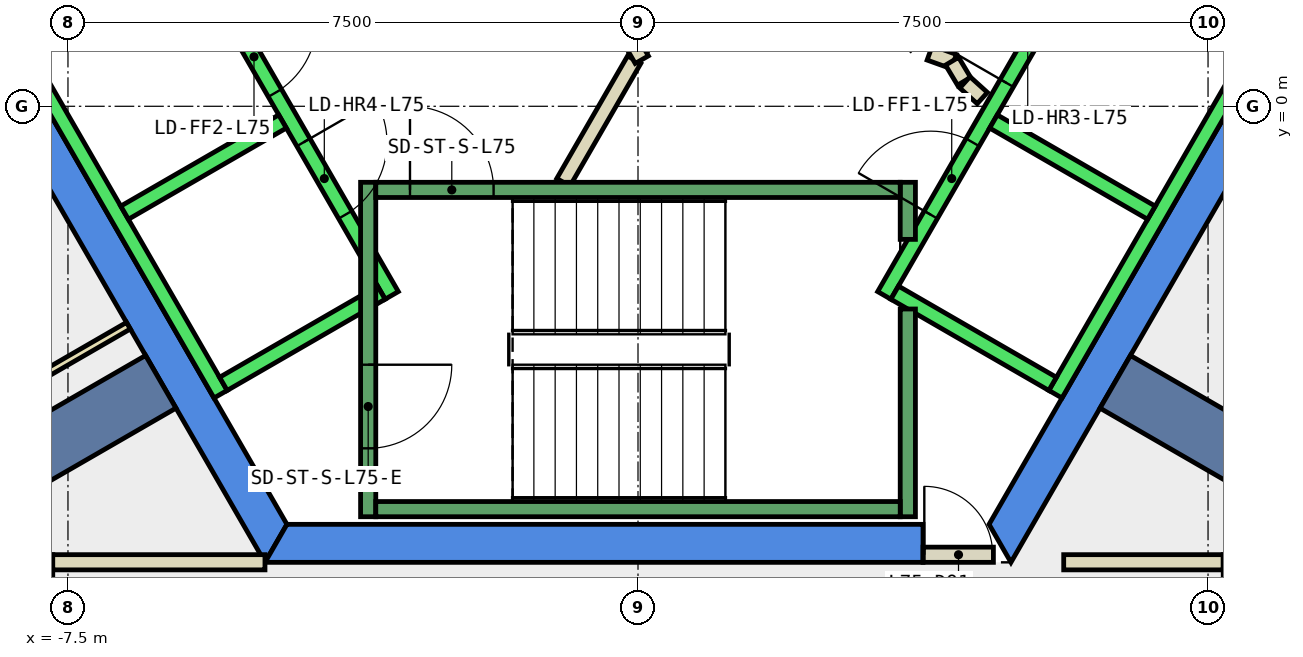
"""IFC4 building model, lengths in metres.
Left out: names, types, materials, properties, quantities, classifications, styles, units other than length and angle.
Written with IfcOpenShell. Run it as: python <this file> out.ifc"""

import sys

from ifc_helpers import new_model, si_unit, direction, frame, frame_2d, origin, place, context, subcontext, project, spatial, polyline, rectangle, outline, extrude, element, fill, save


model = new_model("IFC4")
c1 = context("Model", 3, precision=1e-05, world=origin(), true_north=direction((0.0, 1.0)))
c2 = subcontext(c1, "Body", "Model", "MODEL_VIEW")
j1 = project(units=[si_unit("LENGTHUNIT", "METRE"), si_unit("PLANEANGLEUNIT", "RADIAN")], contexts=[c1])
p1 = place(None, origin())
s1 = spatial("IfcSite", under=j1, at=p1, CompositionType="ELEMENT")
p2 = place(p1, origin())
s2 = spatial("IfcBuilding", under=s1, at=p2, CompositionType="ELEMENT")
p3 = place(p2, frame((0.0, 0.0, 318.8)))
s3 = spatial("IfcBuildingStorey", under=s2, at=p3, CompositionType="ELEMENT", Elevation=318.8)
p4 = place(p3, frame((0.0, 0.0, -0.34)))
e1 = element("IfcWall", 1, at=p4, inside=s3, PredefinedType="SHEAR", context=c2, shape_type="SweptSolid", body=[
    extrude(outline(polyline([(-9.815, 2.5), (-4.907, -6.0), (-4.619, -5.5), (-9.238, 2.5), (-9.815, 2.5)])), origin(), (0.0, 0.0, 1.0), 3.6),
])
p5 = place(p3, frame((0.0, 0.0, -0.34)))
e2 = element("IfcWall", 2, at=p5, inside=s3, PredefinedType="SHEAR", context=c2, shape_type="SweptSolid", body=[
    extrude(outline(polyline([(3.75, -6.0), (3.75, -5.5), (-4.619, -5.5), (-4.907, -6.0), (3.75, -6.0)])), origin(), (0.0, 0.0, 1.0), 3.6),
])
p6 = place(p3, frame((0.0, 0.0, -0.34)))
e3 = element("IfcWall", 3, at=p6, inside=s3, PredefinedType="SHEAR", context=c2, shape_type="SweptSolid", body=[
    extrude(outline(polyline([(4.907, -6.0), (9.815, 2.5), (9.238, 2.5), (4.619, -5.5), (4.907, -6.0)])), origin(), (0.0, 0.0, 1.0), 3.6),
])
for number, where, z_axis, x_axis in (
    (4, (6.279, -3.625, -0.34), (0.0, 0.0, 1.0), (0.866, -0.5, 0.0)),
    (5, (-6.279, -3.625, -0.34), (0.0, 0.0, 1.0), (-0.866, -0.5, 0.0)),
):
    element("IfcWall", number, at=place(p3, frame(where, z_axis=z_axis, x_axis=x_axis)), inside=s3, PredefinedType="SHEAR", context=c2, shape_type="SweptSolid", body=[
        extrude(rectangle(XDim=9.0, YDim=0.8, at=frame_2d((4.5, 0.0))), origin(), (0.0, 0.0, 1.0), 3.6),
    ])
p7 = place(p3, frame((-0.982, -1.0, 0.0), z_axis=(0.0, 0.0, 1.0), x_axis=(0.50024047865, 0.865886518847, 0.0)))
e6 = element("IfcWall", 6, at=p7, inside=s3, PredefinedType="PARTITIONING", context=c2, shape_type="SweptSolid", body=[
    extrude(rectangle(XDim=1.863, YDim=0.2, at=frame_2d((0.931, 0.0))), origin(), (0.0, 0.0, 1.0), 3.26),
])
p8 = place(p3, frame((3.838, 0.702, 0.0), z_axis=(0.0, 0.0, 1.0), x_axis=(0.941035081519, -0.338308993895, 0.0)))
e7 = element("IfcWall", 7, at=p8, inside=s3, PredefinedType="PARTITIONING", context=c2, shape_type="SweptSolid", body=[
    extrude(rectangle(XDim=0.337, YDim=0.2, at=frame_2d((0.168, 0.0))), origin(), (0.0, 0.0, 1.0), 3.26),
])
p9 = place(p3, frame((4.132, 0.593, 0.0), z_axis=(0.0, 0.0, 1.0), x_axis=(0.513561617048, -0.858052717201, 0.0)))
e8 = element("IfcWall", 8, at=p9, inside=s3, PredefinedType="PARTITIONING", context=c2, shape_type="SweptSolid", body=[
    extrude(rectangle(XDim=0.308, YDim=0.2, at=frame_2d((0.154, 0.0))), origin(), (0.0, 0.0, 1.0), 3.26),
])
p10 = place(p3, frame((4.301, 0.315, 0.0), z_axis=(0.0, 0.0, 1.0), x_axis=(0.741798017506, -0.670623367639, 0.0)))
e9 = element("IfcWall", 9, at=p10, inside=s3, PredefinedType="PARTITIONING", context=c2, shape_type="SweptSolid", body=[
    extrude(rectangle(XDim=0.309, YDim=0.2, at=frame_2d((0.154, 0.0))), origin(), (0.0, 0.0, 1.0), 3.26),
])
p11 = place(p3, frame((-2.54, 5.1, 0.0), z_axis=(0.0, 0.0, 1.0), x_axis=(0.499925051871, -0.866068670783, 0.0)))
e10 = element("IfcWall", 10, at=p11, inside=s3, PredefinedType="PARTITIONING", context=c2, shape_type="SweptSolid", body=[
    extrude(rectangle(XDim=5.181, YDim=0.2, at=frame_2d((2.59, 0.0))), origin(), (0.0, 0.0, 1.0), 3.26),
])
p12 = place(p11, frame((2.04, 0.0, 0.0)))
e11 = element("IfcOpeningElement", 11, at=p12, cuts=e10, PredefinedType="OPENING", context=c2, shape_type="SweptSolid", body=[
    extrude(rectangle(XDim=1.0, YDim=2.1, at=frame_2d((0.5, 1.05))), frame((0.0, 0.11, 0.0), z_axis=(0.0, -1.0, 0.0), x_axis=(1.0, 0.0, 0.0)), (0.0, 0.0, 1.0), 0.22),
])
p13 = place(p3, frame((5.601, -5.999, 0.0), z_axis=(0.0, 0.0, 1.0), x_axis=(1.0, 0.0, 0.0)))
e12 = element("IfcWall", 12, at=p13, inside=s3, PredefinedType="PARTITIONING", context=c2, shape_type="SweptSolid", body=[
    extrude(rectangle(XDim=2.099, YDim=0.2, at=frame_2d((1.049, 0.0))), origin(), (0.0, 0.0, 1.0), 3.26),
])
for number, where, z_axis, x_axis in (
    (13, (7.8, -5.899, 0.0), (0.0, 0.0, 1.0), (0.0, -1.0, 0.0)),
    (14, (-7.8, -11.624, 0.0), (0.0, 0.0, 1.0), (0.0, 1.0, 0.0)),
):
    element("IfcWall", number, at=place(p3, frame(where, z_axis=z_axis, x_axis=x_axis)), inside=s3, PredefinedType="PARTITIONING", context=c2, shape_type="SweptSolid", body=[
        extrude(rectangle(XDim=5.725, YDim=0.2, at=frame_2d((2.863, 0.0))), origin(), (0.0, 0.0, 1.0), 3.26),
    ])
p14 = place(p3, frame((-7.7, -5.999, 0.0), z_axis=(0.0, 0.0, 1.0), x_axis=(1.0, 0.0, 0.0)))
e15 = element("IfcWall", 15, at=p14, inside=s3, PredefinedType="PARTITIONING", context=c2, shape_type="SweptSolid", body=[
    extrude(rectangle(XDim=2.792, YDim=0.2, at=frame_2d((1.396, 0.0))), origin(), (0.0, 0.0, 1.0), 3.26),
])
p15 = place(p3, frame((-6.705, -2.887, 0.0), z_axis=(0.0, 0.0, 1.0), x_axis=(-0.866001397039, -0.500041578597, 0.0)))
e16 = element("IfcWall", 16, at=p15, inside=s3, PredefinedType="PARTITIONING", context=c2, shape_type="SweptSolid", body=[
    extrude(rectangle(XDim=6.998, YDim=0.1, at=frame_2d((3.499, 0.0))), origin(), (0.0, 0.0, 1.0), 3.26),
])
p16 = place(p3, frame((3.75, -5.9, 0.0), z_axis=(0.0, 0.0, 1.0), x_axis=(1.0, 0.0, 0.0)))
e17 = element("IfcWall", 17, at=p16, inside=s3, PredefinedType="PARTITIONING", context=c2, shape_type="SweptSolid", body=[
    extrude(rectangle(XDim=0.926, YDim=0.2, at=frame_2d((0.463, 0.0))), origin(), (0.0, 0.0, 1.0), 2.4),
])
p17 = place(p16, frame((0.017, 0.0, 0.0)))
e18 = element("IfcOpeningElement", 18, at=p17, cuts=e17, PredefinedType="OPENING", context=c2, shape_type="SweptSolid", body=[
    extrude(rectangle(XDim=0.9, YDim=2.1, at=frame_2d((0.45, 1.05))), frame((0.0, 0.11, 0.0), z_axis=(0.0, -1.0, 0.0), x_axis=(1.0, 0.0, 0.0)), (0.0, 0.0, 1.0), 0.22),
])
p18 = place(p3, frame((-5.94, 2.188, 0.0), z_axis=(0.0, 0.0, 1.0), x_axis=(0.500034260056, -0.866005622828, 0.0)))
e19 = element("IfcWall", 19, at=p18, inside=s3, PredefinedType="STANDARD", context=c2, shape_type="SweptSolid", body=[
    extrude(rectangle(XDim=5.399, YDim=0.2, at=frame_2d((2.7, 0.0))), origin(), (0.0, 0.0, 1.0), 3.26),
])
p19 = place(p18, frame((3.075, 0.0, 0.0)))
e20 = element("IfcOpeningElement", 20, at=p19, cuts=e19, PredefinedType="OPENING", context=c2, shape_type="SweptSolid", body=[
    extrude(rectangle(XDim=1.1, YDim=2.1, at=frame_2d((0.55, 1.05))), frame((0.0, 0.11, 0.0), z_axis=(0.0, -1.0, 0.0), x_axis=(1.0, 0.0, 0.0)), (0.0, 0.0, 1.0), 0.22),
])
p20 = place(p18, frame((1.225, 0.0, 0.0)))
e21 = element("IfcOpeningElement", 21, at=p20, cuts=e19, PredefinedType="OPENING", context=c2, shape_type="SweptSolid", body=[
    extrude(rectangle(XDim=1.1, YDim=2.1, at=frame_2d((0.55, 1.05))), frame((0.0, 0.11, 0.0), z_axis=(0.0, -1.0, 0.0), x_axis=(1.0, 0.0, 0.0)), (0.0, 0.0, 1.0), 0.22),
])
p21 = place(p3, frame((-8.192, 0.888, 0.0), z_axis=(0.0, 0.0, 1.0), x_axis=(0.500034260056, -0.866005622828, 0.0)))
e22 = element("IfcWall", 22, at=p21, inside=s3, PredefinedType="STANDARD", context=c2, shape_type="SweptSolid", body=[
    extrude(rectangle(XDim=5.399, YDim=0.2, at=frame_2d((2.7, 0.0))), origin(), (0.0, 0.0, 1.0), 3.26),
])
p22 = place(p3, frame((-4.677, -0.2, 0.0), z_axis=(0.0, 0.0, 1.0), x_axis=(-0.865973769406, -0.500089422704, 0.0)))
e23 = element("IfcWall", 23, at=p22, inside=s3, PredefinedType="STANDARD", context=c2, shape_type="SweptSolid", body=[
    extrude(rectangle(XDim=2.399, YDim=0.2, at=frame_2d((1.2, 0.0))), origin(), (0.0, 0.0, 1.0), 3.26),
])
p23 = place(p3, frame((-3.377, -2.452, 0.0), z_axis=(0.0, 0.0, 1.0), x_axis=(-0.865955154139, -0.50012165622, 0.0)))
e24 = element("IfcWall", 24, at=p23, inside=s3, PredefinedType="STANDARD", context=c2, shape_type="SweptSolid", body=[
    extrude(rectangle(XDim=2.4, YDim=0.2, at=frame_2d((1.2, 0.0))), origin(), (0.0, 0.0, 1.0), 3.26),
])
p24 = place(p3, frame((3.24, -2.488, 0.0), z_axis=(0.0, 0.0, 1.0), x_axis=(0.500034260056, 0.866005622828, 0.0)))
e25 = element("IfcWall", 25, at=p24, inside=s3, PredefinedType="STANDARD", context=c2, shape_type="SweptSolid", body=[
    extrude(rectangle(XDim=5.399, YDim=0.2, at=frame_2d((2.7, 0.0))), origin(), (0.0, 0.0, 1.0), 3.26),
])
p25 = place(p24, frame((3.225, 0.0, 0.0)))
e26 = element("IfcOpeningElement", 26, at=p25, cuts=e25, PredefinedType="OPENING", context=c2, shape_type="SweptSolid", body=[
    extrude(rectangle(XDim=1.1, YDim=2.1, at=frame_2d((0.55, 1.05))), frame((0.0, 0.11, 0.0), z_axis=(0.0, -1.0, 0.0), x_axis=(1.0, 0.0, 0.0)), (0.0, 0.0, 1.0), 0.22),
])
p26 = place(p24, frame((1.225, 0.0, 0.0)))
e27 = element("IfcOpeningElement", 27, at=p26, cuts=e25, PredefinedType="OPENING", context=c2, shape_type="SweptSolid", body=[
    extrude(rectangle(XDim=1.1, YDim=2.1, at=frame_2d((0.55, 1.05))), frame((0.0, 0.11, 0.0), z_axis=(0.0, -1.0, 0.0), x_axis=(1.0, 0.0, 0.0)), (0.0, 0.0, 1.0), 0.22),
])
p27 = place(p3, frame((5.492, -3.788, 0.0), z_axis=(0.0, 0.0, 1.0), x_axis=(0.500034260056, 0.866005622828, 0.0)))
e28 = element("IfcWall", 28, at=p27, inside=s3, PredefinedType="STANDARD", context=c2, shape_type="SweptSolid", body=[
    extrude(rectangle(XDim=5.399, YDim=0.2, at=frame_2d((2.7, 0.0))), origin(), (0.0, 0.0, 1.0), 3.26),
])
p28 = place(p3, frame((3.377, -2.452, 0.0), z_axis=(0.0, 0.0, 1.0), x_axis=(0.865955154139, -0.50012165622, 0.0)))
e29 = element("IfcWall", 29, at=p28, inside=s3, PredefinedType="STANDARD", context=c2, shape_type="SweptSolid", body=[
    extrude(rectangle(XDim=2.4, YDim=0.2, at=frame_2d((1.2, 0.0))), origin(), (0.0, 0.0, 1.0), 3.26),
])
p29 = place(p3, frame((4.677, -0.2, 0.0), z_axis=(0.0, 0.0, 1.0), x_axis=(0.865973769406, -0.500089422704, 0.0)))
e30 = element("IfcWall", 30, at=p29, inside=s3, PredefinedType="STANDARD", context=c2, shape_type="SweptSolid", body=[
    extrude(rectangle(XDim=2.399, YDim=0.2, at=frame_2d((1.2, 0.0))), origin(), (0.0, 0.0, 1.0), 3.26),
])
p30 = place(p3, frame((-3.55, -1.0, 0.0), z_axis=(0.0, 0.0, 1.0), x_axis=(0.0, -1.0, 0.0)))
e31 = element("IfcWall", 31, at=p30, inside=s3, PredefinedType="STANDARD", context=c2, shape_type="SweptSolid", body=[
    extrude(rectangle(XDim=4.4, YDim=0.2, at=frame_2d((2.2, 0.0))), origin(), (0.0, 0.0, 1.0), 3.26),
])
p31 = place(p30, frame((2.4, 0.0, 0.0)))
e32 = element("IfcOpeningElement", 32, at=p31, cuts=e31, PredefinedType="OPENING", context=c2, shape_type="SweptSolid", body=[
    extrude(rectangle(XDim=1.1, YDim=2.2, at=frame_2d((0.55, 1.1))), frame((0.0, 0.11, 0.0), z_axis=(0.0, -1.0, 0.0), x_axis=(1.0, 0.0, 0.0)), (0.0, 0.0, 1.0), 0.22),
])
p32 = place(p3, frame((3.55, -2.667, 0.0), z_axis=(0.0, 0.0, 1.0), x_axis=(0.0, -1.0, 0.0)))
e33 = element("IfcWall", 33, at=p32, inside=s3, PredefinedType="STANDARD", context=c2, shape_type="SweptSolid", body=[
    extrude(rectangle(XDim=2.733, YDim=0.2, at=frame_2d((1.366, 0.0))), origin(), (0.0, 0.0, 1.0), 3.26),
])
p33 = place(p3, frame((3.55, -1.0, 0.0), z_axis=(0.0, 0.0, 1.0), x_axis=(0.0, -1.0, 0.0)))
e34 = element("IfcWall", 34, at=p33, inside=s3, PredefinedType="STANDARD", context=c2, shape_type="SweptSolid", body=[
    extrude(rectangle(XDim=0.751, YDim=0.2, at=frame_2d((0.375, 0.0))), origin(), (0.0, 0.0, 1.0), 3.26),
])
p34 = place(p3, frame((-3.45, -1.1, 0.0), z_axis=(0.0, 0.0, 1.0), x_axis=(1.0, 0.0, 0.0)))
e35 = element("IfcWall", 35, at=p34, inside=s3, PredefinedType="STANDARD", context=c2, shape_type="SweptSolid", body=[
    extrude(rectangle(XDim=6.9, YDim=0.2, at=frame_2d((3.45, 0.0))), origin(), (0.0, 0.0, 1.0), 3.26),
])
p35 = place(p34, frame((0.45, 0.0, 0.0)))
e36 = element("IfcOpeningElement", 36, at=p35, cuts=e35, PredefinedType="OPENING", context=c2, shape_type="SweptSolid", body=[
    extrude(rectangle(XDim=1.1, YDim=2.2, at=frame_2d((0.55, 1.1))), frame((0.0, 0.11, 0.0), z_axis=(0.0, -1.0, 0.0), x_axis=(1.0, 0.0, 0.0)), (0.0, 0.0, 1.0), 0.22),
])
p36 = place(p3, frame((-3.45, -5.3, 0.0), z_axis=(0.0, 0.0, 1.0), x_axis=(1.0, 0.0, 0.0)))
e37 = element("IfcWall", 37, at=p36, inside=s3, PredefinedType="STANDARD", context=c2, shape_type="SweptSolid", body=[
    extrude(rectangle(XDim=6.9, YDim=0.2, at=frame_2d((3.45, 0.0))), origin(), (0.0, 0.0, 1.0), 3.26),
])
p37 = place(p17, origin())
e38 = element("IfcDoor", 38, at=p37, inside=s3, OperationType="SINGLE_SWING_LEFT", PredefinedType="DOOR", context=c2, shape_type="SweptSolid", body=[
    extrude(rectangle(XDim=0.9, YDim=2.1, at=frame_2d((0.45, 1.05))), frame((0.0, 0.025, 0.0), z_axis=(0.0, -1.0, 0.0), x_axis=(1.0, 0.0, 0.0)), (0.0, 0.0, 1.0), 0.05),
])
fill(e18, e38)
p38 = place(p25, origin())
e39 = element("IfcDoor", 39, at=p38, inside=s3, OperationType="SLIDING_TO_LEFT", PredefinedType="DOOR", context=c2, shape_type="SweptSolid", body=[
    extrude(rectangle(XDim=1.1, YDim=2.1, at=frame_2d((0.55, 1.05))), frame((0.0, 0.025, 0.0), z_axis=(0.0, -1.0, 0.0), x_axis=(1.0, 0.0, 0.0)), (0.0, 0.0, 1.0), 0.05),
])
fill(e26, e39)
p39 = place(p19, origin())
e40 = element("IfcDoor", 40, at=p39, inside=s3, OperationType="SLIDING_TO_LEFT", PredefinedType="DOOR", context=c2, shape_type="SweptSolid", body=[
    extrude(rectangle(XDim=1.1, YDim=2.1, at=frame_2d((0.55, 1.05))), frame((0.0, 0.025, 0.0), z_axis=(0.0, -1.0, 0.0), x_axis=(1.0, 0.0, 0.0)), (0.0, 0.0, 1.0), 0.05),
])
fill(e20, e40)
p40 = place(p26, origin())
e41 = element("IfcDoor", 41, at=p40, inside=s3, OperationType="SLIDING_TO_LEFT", PredefinedType="DOOR", context=c2, shape_type="SweptSolid", body=[
    extrude(rectangle(XDim=1.1, YDim=2.1, at=frame_2d((0.55, 1.05))), frame((0.0, 0.025, 0.0), z_axis=(0.0, -1.0, 0.0), x_axis=(1.0, 0.0, 0.0)), (0.0, 0.0, 1.0), 0.05),
])
fill(e27, e41)
p41 = place(p20, origin())
e42 = element("IfcDoor", 42, at=p41, inside=s3, OperationType="SLIDING_TO_LEFT", PredefinedType="DOOR", context=c2, shape_type="SweptSolid", body=[
    extrude(rectangle(XDim=1.1, YDim=2.1, at=frame_2d((0.55, 1.05))), frame((0.0, 0.025, 0.0), z_axis=(0.0, -1.0, 0.0), x_axis=(1.0, 0.0, 0.0)), (0.0, 0.0, 1.0), 0.05),
])
fill(e21, e42)
p42 = place(p35, origin())
e43 = element("IfcDoor", 43, at=p42, inside=s3, OperationType="SINGLE_SWING_LEFT", PredefinedType="DOOR", context=c2, shape_type="SweptSolid", body=[
    extrude(rectangle(XDim=1.1, YDim=2.2, at=frame_2d((0.55, 1.1))), frame((0.0, 0.025, 0.0), z_axis=(0.0, -1.0, 0.0), x_axis=(1.0, 0.0, 0.0)), (0.0, 0.0, 1.0), 0.05),
])
fill(e36, e43)
p43 = place(p31, origin())
e44 = element("IfcDoor", 44, at=p43, inside=s3, OperationType="SINGLE_SWING_LEFT", PredefinedType="DOOR", context=c2, shape_type="SweptSolid", body=[
    extrude(rectangle(XDim=1.1, YDim=2.2, at=frame_2d((0.55, 1.1))), frame((0.0, 0.025, 0.0), z_axis=(0.0, -1.0, 0.0), x_axis=(1.0, 0.0, 0.0)), (0.0, 0.0, 1.0), 0.05),
])
fill(e32, e44)
save(model, sys.argv[1])
